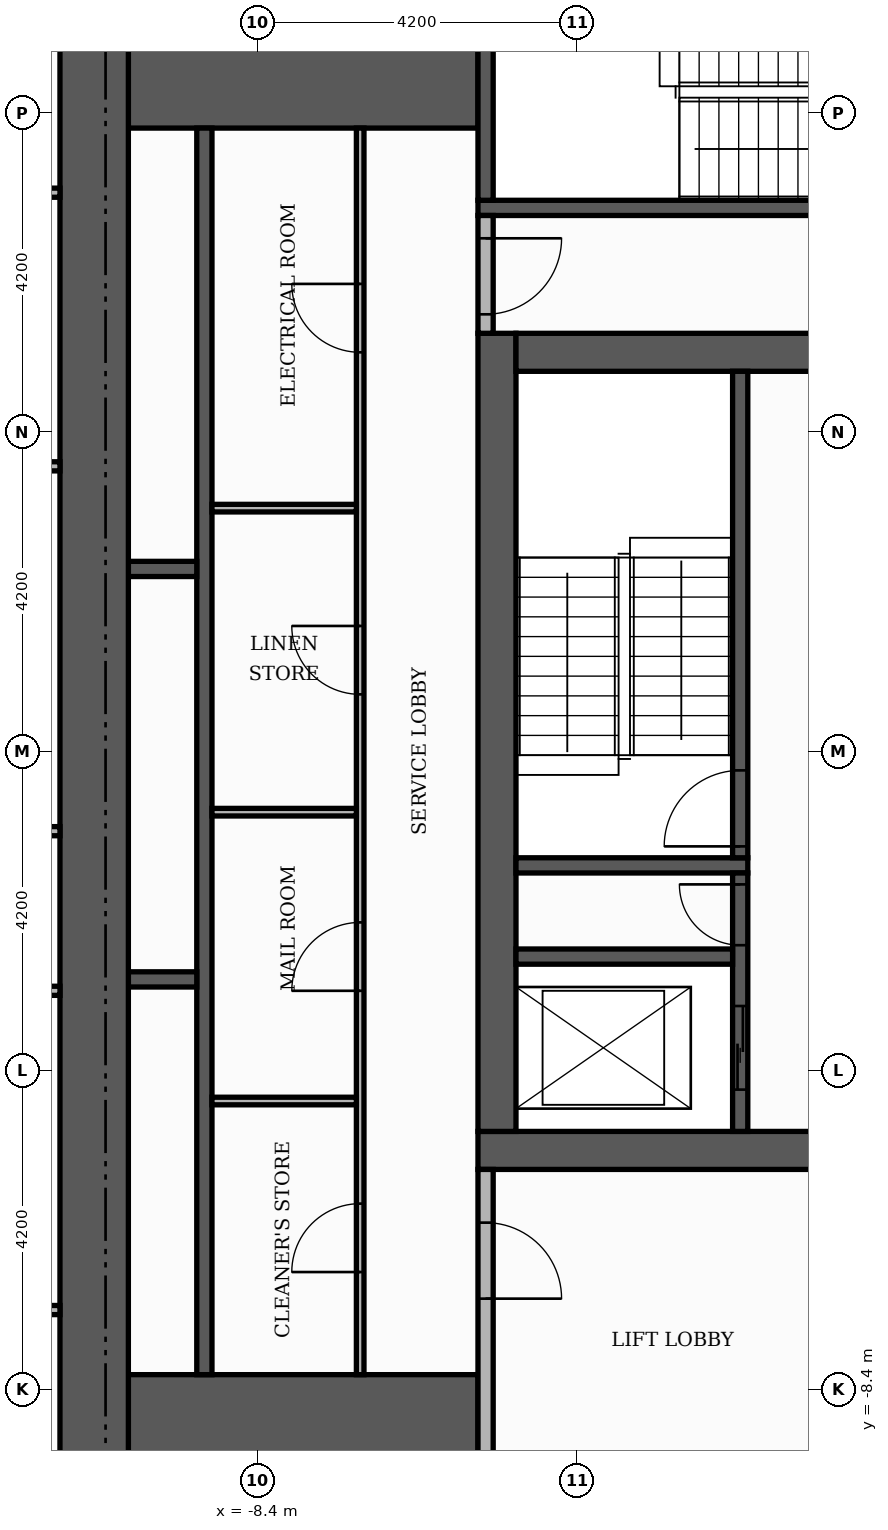
"""IFC4 building model, lengths in metres.
Left out: names, types, materials, properties, quantities, classifications, styles, units other than length and angle.
Written with IfcOpenShell. Run it as: python <this file> out.ifc"""

import sys

from ifc_helpers import new_model, si_unit, direction, frame, frame_2d, origin, place, context, subcontext, project, spatial, rectangle, extrude, element, fill, save


model = new_model("IFC4")
c1 = context("Model", 3, precision=1e-05, world=origin(), true_north=direction((0.0, 1.0)))
c2 = subcontext(c1, "Body", "Model", "MODEL_VIEW")
j1 = project(units=[si_unit("LENGTHUNIT", "METRE"), si_unit("PLANEANGLEUNIT", "RADIAN")], contexts=[c1])
p1 = place(None, origin())
s1 = spatial("IfcSite", under=j1, at=p1, CompositionType="ELEMENT")
p2 = place(p1, origin())
s2 = spatial("IfcBuilding", under=s1, at=p2, CompositionType="ELEMENT")
p3 = place(p2, frame((0.0, 0.0, 165.0)))
s3 = spatial("IfcBuildingStorey", under=s2, at=p3, CompositionType="ELEMENT", Elevation=165.0)
p4 = place(p3, frame((-5.5, -5.25, 0.0), z_axis=(0.0, 0.0, 1.0), x_axis=(1.0, 0.0, 0.0)))
e1 = element("IfcWall", 1, at=p4, inside=s3, PredefinedType="SHEAR", context=c2, shape_type="SweptSolid", body=[
    extrude(rectangle(XDim=11.0, YDim=0.5, at=frame_2d((5.5, 0.0))), origin(), (0.0, 0.0, 1.0), 3.48),
])
p5 = place(p4, frame((4.9, 0.0, 0.0)))
e2 = element("IfcOpeningElement", 2, at=p5, cuts=e1, PredefinedType="OPENING", context=c2, shape_type="SweptSolid", body=[
    extrude(rectangle(XDim=1.2, YDim=2.1, at=frame_2d((0.6, 1.05))), frame((0.0, 0.26, 0.0), z_axis=(0.0, -1.0, 0.0), x_axis=(1.0, 0.0, 0.0)), (0.0, 0.0, 1.0), 0.52),
])
p6 = place(p3, frame((-5.25, -5.0, 0.0), z_axis=(0.0, 0.0, 1.0), x_axis=(0.0, 1.0, 0.0)))
e3 = element("IfcWall", 3, at=p6, inside=s3, PredefinedType="SHEAR", context=c2, shape_type="SweptSolid", body=[
    extrude(rectangle(XDim=10.5, YDim=0.5, at=frame_2d((5.25, 0.0))), origin(), (0.0, 0.0, 1.0), 3.48),
])
p7 = place(p3, frame((-5.0, 5.25, 0.0), z_axis=(0.0, 0.0, 1.0), x_axis=(1.0, 0.0, 0.0)))
e4 = element("IfcWall", 4, at=p7, inside=s3, PredefinedType="SHEAR", context=c2, shape_type="SweptSolid", body=[
    extrude(rectangle(XDim=10.0, YDim=0.5, at=frame_2d((5.0, 0.0))), origin(), (0.0, 0.0, 1.0), 3.48),
])
p8 = place(p7, frame((4.4, 0.0, 0.0)))
e5 = element("IfcOpeningElement", 5, at=p8, cuts=e4, PredefinedType="OPENING", context=c2, shape_type="SweptSolid", body=[
    extrude(rectangle(XDim=1.2, YDim=2.1, at=frame_2d((0.6, 1.05))), frame((0.0, 0.26, 0.0), z_axis=(0.0, -1.0, 0.0), x_axis=(1.0, 0.0, 0.0)), (0.0, 0.0, 1.0), 0.52),
])
for number, where, z_axis, x_axis in (
    (6, (-10.1, -9.15, 0.0), (0.0, 0.0, 1.0), (1.0, 0.0, 0.0)),
    (7, (-10.1, 9.15, 0.0), (0.0, 0.0, 1.0), (1.0, 0.0, 0.0)),
):
    element("IfcWall", number, at=place(p3, frame(where, z_axis=z_axis, x_axis=x_axis)), inside=s3, PredefinedType="SHEAR", context=c2, shape_type="SweptSolid", body=[
        extrude(rectangle(XDim=4.6, YDim=1.9, at=frame_2d((2.3, 0.0))), origin(), (0.0, 0.0, 1.0), 3.48),
    ])
p9 = place(p3, frame((-5.0, -1.5, 0.0), z_axis=(0.0, 0.0, 1.0), x_axis=(1.0, 0.0, 0.0)))
e8 = element("IfcWall", 8, at=p9, inside=s3, PredefinedType="SHEAR", context=c2, shape_type="SweptSolid", body=[
    extrude(rectangle(XDim=3.05, YDim=0.2, at=frame_2d((1.525, 0.0))), origin(), (0.0, 0.0, 1.0), 3.48),
])
p10 = place(p3, frame((-2.05, -1.4, 0.0), z_axis=(0.0, 0.0, 1.0), x_axis=(0.0, 1.0, 0.0)))
e9 = element("IfcWall", 9, at=p10, inside=s3, PredefinedType="SHEAR", context=c2, shape_type="SweptSolid", body=[
    extrude(rectangle(XDim=6.4, YDim=0.2, at=frame_2d((3.2, 0.0))), origin(), (0.0, 0.0, 1.0), 3.48),
])
p11 = place(p10, frame((0.15, 0.0, 0.0)))
e10 = element("IfcOpeningElement", 10, at=p11, cuts=e9, PredefinedType="OPENING", context=c2, shape_type="SweptSolid", body=[
    extrude(rectangle(XDim=1.0, YDim=2.1, at=frame_2d((0.5, 1.05))), frame((0.0, 0.11, 0.0), z_axis=(0.0, -1.0, 0.0), x_axis=(1.0, 0.0, 0.0)), (0.0, 0.0, 1.0), 0.22),
])
p12 = place(p3, frame((-5.5, 7.15, 0.0), z_axis=(0.0, 0.0, 1.0), x_axis=(1.0, 0.0, 0.0)))
e11 = element("IfcWall", 11, at=p12, inside=s3, PredefinedType="SHEAR", context=c2, shape_type="SweptSolid", body=[
    extrude(rectangle(XDim=6.8, YDim=0.2, at=frame_2d((3.4, 0.0))), origin(), (0.0, 0.0, 1.0), 3.48),
])
p13 = place(p3, frame((-5.4, 7.25, 0.0), z_axis=(0.0, 0.0, 1.0), x_axis=(0.0, 1.0, 0.0)))
e12 = element("IfcWall", 12, at=p13, inside=s3, PredefinedType="SHEAR", context=c2, shape_type="SweptSolid", body=[
    extrude(rectangle(XDim=2.85, YDim=0.2, at=frame_2d((1.425, 0.0))), origin(), (0.0, 0.0, 1.0), 3.48),
])
p14 = place(p3, frame((-9.1, -8.2, 0.0), z_axis=(0.0, 0.0, 1.0), x_axis=(0.0, 1.0, 0.0)))
e13 = element("IfcWall", 13, at=p14, inside=s3, PredefinedType="SHEAR", context=c2, shape_type="SweptSolid", body=[
    extrude(rectangle(XDim=16.4, YDim=0.2, at=frame_2d((8.2, 0.0))), origin(), (0.0, 0.0, 1.0), 3.48),
])
p15 = place(p3, frame((-2.05, -5.0, 0.0), z_axis=(0.0, 0.0, 1.0), x_axis=(0.0, 1.0, 0.0)))
e14 = element("IfcWall", 14, at=p15, inside=s3, PredefinedType="SHEAR", context=c2, shape_type="SweptSolid", body=[
    extrude(rectangle(XDim=3.4, YDim=0.2, at=frame_2d((1.7, 0.0))), origin(), (0.0, 0.0, 1.0), 3.48),
])
p16 = place(p15, frame((0.55, 0.0, 0.0)))
e15 = element("IfcOpeningElement", 15, at=p16, cuts=e14, PredefinedType="OPENING", context=c2, shape_type="SweptSolid", body=[
    extrude(rectangle(XDim=1.1, YDim=2.1, at=frame_2d((0.55, 1.05))), frame((0.0, 0.11, 0.0), z_axis=(0.0, -1.0, 0.0), x_axis=(1.0, 0.0, 0.0)), (0.0, 0.0, 1.0), 0.22),
])
p17 = place(p15, frame((2.45, 0.0, 0.0)))
e16 = element("IfcOpeningElement", 16, at=p17, cuts=e14, PredefinedType="OPENING", context=c2, shape_type="SweptSolid", body=[
    extrude(rectangle(XDim=0.8, YDim=2.1, at=frame_2d((0.4, 1.05))), frame((0.0, 0.11, 0.0), z_axis=(0.0, -1.0, 0.0), x_axis=(1.0, 0.0, 0.0)), (0.0, 0.0, 1.0), 0.22),
])
p18 = place(p3, frame((-10.1, -3.0, 0.0), z_axis=(0.0, 0.0, 1.0), x_axis=(1.0, 0.0, 0.0)))
e17 = element("IfcWall", 17, at=p18, inside=s3, PredefinedType="SHEAR", context=c2, shape_type="SweptSolid", body=[
    extrude(rectangle(XDim=0.9, YDim=0.2, at=frame_2d((0.45, 0.0))), origin(), (0.0, 0.0, 1.0), 3.48),
])
p19 = place(p3, frame((-5.0, -2.7, 0.0), z_axis=(0.0, 0.0, 1.0), x_axis=(1.0, 0.0, 0.0)))
e18 = element("IfcWall", 18, at=p19, inside=s3, PredefinedType="SHEAR", context=c2, shape_type="SweptSolid", body=[
    extrude(rectangle(XDim=2.85, YDim=0.2, at=frame_2d((1.425, 0.0))), origin(), (0.0, 0.0, 1.0), 3.48),
])
p20 = place(p3, frame((-10.1, 2.4, 0.0), z_axis=(0.0, 0.0, 1.0), x_axis=(1.0, 0.0, 0.0)))
e19 = element("IfcWall", 19, at=p20, inside=s3, PredefinedType="SHEAR", context=c2, shape_type="SweptSolid", body=[
    extrude(rectangle(XDim=0.9, YDim=0.2, at=frame_2d((0.45, 0.0))), origin(), (0.0, 0.0, 1.0), 3.48),
])
p21 = place(p3, frame((-10.55, -10.1, 0.0), z_axis=(0.0, 0.0, 1.0), x_axis=(0.0, 1.0, 0.0)))
e20 = element("IfcWall", 20, at=p21, inside=s3, PredefinedType="SHEAR", context=c2, shape_type="SweptSolid", body=[
    extrude(rectangle(XDim=20.2, YDim=0.9, at=frame_2d((10.1, 0.0))), origin(), (0.0, 0.0, 1.0), 3.48),
])
p22 = place(p3, frame((-5.4, -10.1, 0.0), z_axis=(0.0, 0.0, 1.0), x_axis=(0.0, 1.0, 0.0)))
e21 = element("IfcWall", 21, at=p22, inside=s3, PredefinedType="PARTITIONING", context=c2, shape_type="SweptSolid", body=[
    extrude(rectangle(XDim=4.6, YDim=0.2, at=frame_2d((2.3, 0.0))), origin(), (0.0, 0.0, 1.0), 3.48),
])
p23 = place(p22, frame((2.9, 0.0, 0.0)))
e22 = element("IfcOpeningElement", 22, at=p23, cuts=e21, PredefinedType="OPENING", context=c2, shape_type="SweptSolid", body=[
    extrude(rectangle(XDim=1.0, YDim=2.1, at=frame_2d((0.5, 1.05))), frame((0.0, 0.11, 0.0), z_axis=(0.0, -1.0, 0.0), x_axis=(1.0, 0.0, 0.0)), (0.0, 0.0, 1.0), 0.22),
])
p24 = place(p3, frame((-7.05, -8.2, 0.0), z_axis=(0.0, 0.0, 1.0), x_axis=(0.0, 1.0, 0.0)))
e23 = element("IfcWall", 23, at=p24, inside=s3, PredefinedType="PARTITIONING", context=c2, shape_type="SweptSolid", body=[
    extrude(rectangle(XDim=16.4, YDim=0.1, at=frame_2d((8.2, 0.0))), origin(), (0.0, 0.0, 1.0), 3.48),
])
p25 = place(p24, frame((1.35, 0.0, 0.0)))
e24 = element("IfcOpeningElement", 24, at=p25, cuts=e23, PredefinedType="OPENING", context=c2, shape_type="SweptSolid", body=[
    extrude(rectangle(XDim=0.9, YDim=2.1, at=frame_2d((0.45, 1.05))), frame((0.0, 0.06, 0.0), z_axis=(0.0, -1.0, 0.0), x_axis=(1.0, 0.0, 0.0)), (0.0, 0.0, 1.0), 0.12),
])
p26 = place(p24, frame((5.05, 0.0, 0.0)))
e25 = element("IfcOpeningElement", 25, at=p26, cuts=e23, PredefinedType="OPENING", context=c2, shape_type="SweptSolid", body=[
    extrude(rectangle(XDim=0.9, YDim=2.1, at=frame_2d((0.45, 1.05))), frame((0.0, 0.06, 0.0), z_axis=(0.0, -1.0, 0.0), x_axis=(1.0, 0.0, 0.0)), (0.0, 0.0, 1.0), 0.12),
])
p27 = place(p24, frame((8.95, 0.0, 0.0)))
e26 = element("IfcOpeningElement", 26, at=p27, cuts=e23, PredefinedType="OPENING", context=c2, shape_type="SweptSolid", body=[
    extrude(rectangle(XDim=0.9, YDim=2.1, at=frame_2d((0.45, 1.05))), frame((0.0, 0.06, 0.0), z_axis=(0.0, -1.0, 0.0), x_axis=(1.0, 0.0, 0.0)), (0.0, 0.0, 1.0), 0.12),
])
p28 = place(p24, frame((13.45, 0.0, 0.0)))
e27 = element("IfcOpeningElement", 27, at=p28, cuts=e23, PredefinedType="OPENING", context=c2, shape_type="SweptSolid", body=[
    extrude(rectangle(XDim=0.9, YDim=2.1, at=frame_2d((0.45, 1.05))), frame((0.0, 0.06, 0.0), z_axis=(0.0, -1.0, 0.0), x_axis=(1.0, 0.0, 0.0)), (0.0, 0.0, 1.0), 0.12),
])
for number, where, z_axis, x_axis in (
    (28, (-9.0, -4.6, 0.0), (0.0, 0.0, 1.0), (1.0, 0.0, 0.0)),
    (29, (-9.0, -0.8, 0.0), (0.0, 0.0, 1.0), (1.0, 0.0, 0.0)),
    (30, (-9.0, 3.2, 0.0), (0.0, 0.0, 1.0), (1.0, 0.0, 0.0)),
):
    element("IfcWall", number, at=place(p3, frame(where, z_axis=z_axis, x_axis=x_axis)), inside=s3, PredefinedType="PARTITIONING", context=c2, shape_type="SweptSolid", body=[
        extrude(rectangle(XDim=1.9, YDim=0.1, at=frame_2d((0.95, 0.0))), origin(), (0.0, 0.0, 1.0), 3.48),
    ])
p29 = place(p3, frame((-5.4, 5.5, 0.0), z_axis=(0.0, 0.0, 1.0), x_axis=(0.0, 1.0, 0.0)))
e31 = element("IfcWall", 31, at=p29, inside=s3, PredefinedType="PARTITIONING", context=c2, shape_type="SweptSolid", body=[
    extrude(rectangle(XDim=1.55, YDim=0.2, at=frame_2d((0.775, 0.0))), origin(), (0.0, 0.0, 1.0), 3.48),
])
p30 = place(p29, frame((0.25, 0.0, 0.0)))
e32 = element("IfcOpeningElement", 32, at=p30, cuts=e31, PredefinedType="OPENING", context=c2, shape_type="SweptSolid", body=[
    extrude(rectangle(XDim=1.0, YDim=2.1, at=frame_2d((0.5, 1.05))), frame((0.0, 0.11, 0.0), z_axis=(0.0, -1.0, 0.0), x_axis=(1.0, 0.0, 0.0)), (0.0, 0.0, 1.0), 0.22),
])
for number, where, z_axis, x_axis in (
    (33, (-18.32, -7.35, 0.0), (0.0, 0.0, 1.0), (1.0, 0.0, 0.0)),
    (34, (-18.32, -3.15, 0.0), (0.0, 0.0, 1.0), (1.0, 0.0, 0.0)),
    (35, (-18.32, -1.05, 0.0), (0.0, 0.0, 1.0), (1.0, 0.0, 0.0)),
    (36, (-18.32, 3.75, 0.0), (0.0, 0.0, 1.0), (1.0, 0.0, 0.0)),
):
    element("IfcWall", number, at=place(p3, frame(where, z_axis=z_axis, x_axis=x_axis)), inside=s3, PredefinedType="PARTITIONING", context=c2, shape_type="SweptSolid", body=[
        extrude(rectangle(XDim=7.32, YDim=0.12, at=frame_2d((3.66, 0.0))), origin(), (0.0, 0.0, 1.0), 3.48),
    ])
p31 = place(p3, frame((-18.32, 7.35, 0.0), z_axis=(0.0, 0.0, 1.0), x_axis=(1.0, 0.0, 0.0)))
e37 = element("IfcWall", 37, at=p31, inside=s3, PredefinedType="PARTITIONING", context=c2, shape_type="SweptSolid", body=[
    extrude(rectangle(XDim=7.32, YDim=0.12, at=frame_2d((3.66, 0.0))), origin(), (0.0, 0.0, 1.0), 3.48),
])
p32 = place(p31, frame((3.21, 0.0, 0.0)))
e38 = element("IfcOpeningElement", 38, at=p32, cuts=e37, PredefinedType="OPENING", context=c2, shape_type="SweptSolid", body=[
    extrude(rectangle(XDim=0.9, YDim=2.1, at=frame_2d((0.45, 1.05))), frame((0.0, 0.07, 0.0), z_axis=(0.0, -1.0, 0.0), x_axis=(1.0, 0.0, 0.0)), (0.0, 0.0, 1.0), 0.14),
])
p33 = place(p16, origin())
e39 = element("IfcDoor", 39, at=p33, inside=s3, OperationType="SLIDING_TO_LEFT", PredefinedType="DOOR", context=c2, shape_type="SweptSolid", body=[
    extrude(rectangle(XDim=1.1, YDim=2.1, at=frame_2d((0.55, 1.05))), frame((0.0, 0.025, 0.0), z_axis=(0.0, -1.0, 0.0), x_axis=(1.0, 0.0, 0.0)), (0.0, 0.0, 1.0), 0.05),
])
fill(e15, e39)
p34 = place(p11, origin())
e40 = element("IfcDoor", 40, at=p34, inside=s3, OperationType="SINGLE_SWING_LEFT", PredefinedType="DOOR", context=c2, shape_type="SweptSolid", body=[
    extrude(rectangle(XDim=1.0, YDim=2.1, at=frame_2d((0.5, 1.05))), frame((0.0, 0.025, 0.0), z_axis=(0.0, -1.0, 0.0), x_axis=(1.0, 0.0, 0.0)), (0.0, 0.0, 1.0), 0.05),
])
fill(e10, e40)
p35 = place(p17, origin())
e41 = element("IfcDoor", 41, at=p35, inside=s3, OperationType="SINGLE_SWING_RIGHT", PredefinedType="DOOR", context=c2, shape_type="SweptSolid", body=[
    extrude(rectangle(XDim=0.8, YDim=2.1, at=frame_2d((0.4, 1.05))), frame((0.0, 0.025, 0.0), z_axis=(0.0, -1.0, 0.0), x_axis=(1.0, 0.0, 0.0)), (0.0, 0.0, 1.0), 0.05),
])
fill(e16, e41)
p36 = place(p30, frame((1.0, 0.0, 0.0), z_axis=(0.0, 0.0, 1.0), x_axis=(-1.0, 0.0, 0.0)))
e42 = element("IfcDoor", 42, at=p36, inside=s3, OperationType="SINGLE_SWING_RIGHT", PredefinedType="DOOR", context=c2, shape_type="SweptSolid", body=[
    extrude(rectangle(XDim=1.0, YDim=2.1, at=frame_2d((0.5, 1.05))), frame((0.0, 0.025, 0.0), z_axis=(0.0, -1.0, 0.0), x_axis=(1.0, 0.0, 0.0)), (0.0, 0.0, 1.0), 0.05),
])
fill(e32, e42)
p37 = place(p23, frame((1.0, 0.0, 0.0), z_axis=(0.0, 0.0, 1.0), x_axis=(-1.0, 0.0, 0.0)))
e43 = element("IfcDoor", 43, at=p37, inside=s3, OperationType="SINGLE_SWING_LEFT", PredefinedType="DOOR", context=c2, shape_type="SweptSolid", body=[
    extrude(rectangle(XDim=1.0, YDim=2.1, at=frame_2d((0.5, 1.05))), frame((0.0, 0.025, 0.0), z_axis=(0.0, -1.0, 0.0), x_axis=(1.0, 0.0, 0.0)), (0.0, 0.0, 1.0), 0.05),
])
fill(e22, e43)
p38 = place(p25, origin())
e44 = element("IfcDoor", 44, at=p38, inside=s3, OperationType="SINGLE_SWING_LEFT", PredefinedType="DOOR", context=c2, shape_type="SweptSolid", body=[
    extrude(rectangle(XDim=0.9, YDim=2.1, at=frame_2d((0.45, 1.05))), frame((0.0, 0.025, 0.0), z_axis=(0.0, -1.0, 0.0), x_axis=(1.0, 0.0, 0.0)), (0.0, 0.0, 1.0), 0.05),
])
fill(e24, e44)
p39 = place(p26, origin())
e45 = element("IfcDoor", 45, at=p39, inside=s3, OperationType="SINGLE_SWING_LEFT", PredefinedType="DOOR", context=c2, shape_type="SweptSolid", body=[
    extrude(rectangle(XDim=0.9, YDim=2.1, at=frame_2d((0.45, 1.05))), frame((0.0, 0.025, 0.0), z_axis=(0.0, -1.0, 0.0), x_axis=(1.0, 0.0, 0.0)), (0.0, 0.0, 1.0), 0.05),
])
fill(e25, e45)
p40 = place(p27, origin())
e46 = element("IfcDoor", 46, at=p40, inside=s3, OperationType="SINGLE_SWING_RIGHT", PredefinedType="DOOR", context=c2, shape_type="SweptSolid", body=[
    extrude(rectangle(XDim=0.9, YDim=2.1, at=frame_2d((0.45, 1.05))), frame((0.0, 0.025, 0.0), z_axis=(0.0, -1.0, 0.0), x_axis=(1.0, 0.0, 0.0)), (0.0, 0.0, 1.0), 0.05),
])
fill(e26, e46)
p41 = place(p28, origin())
e47 = element("IfcDoor", 47, at=p41, inside=s3, OperationType="SINGLE_SWING_RIGHT", PredefinedType="DOOR", context=c2, shape_type="SweptSolid", body=[
    extrude(rectangle(XDim=0.9, YDim=2.1, at=frame_2d((0.45, 1.05))), frame((0.0, 0.025, 0.0), z_axis=(0.0, -1.0, 0.0), x_axis=(1.0, 0.0, 0.0)), (0.0, 0.0, 1.0), 0.05),
])
fill(e27, e47)
save(model, sys.argv[1])
